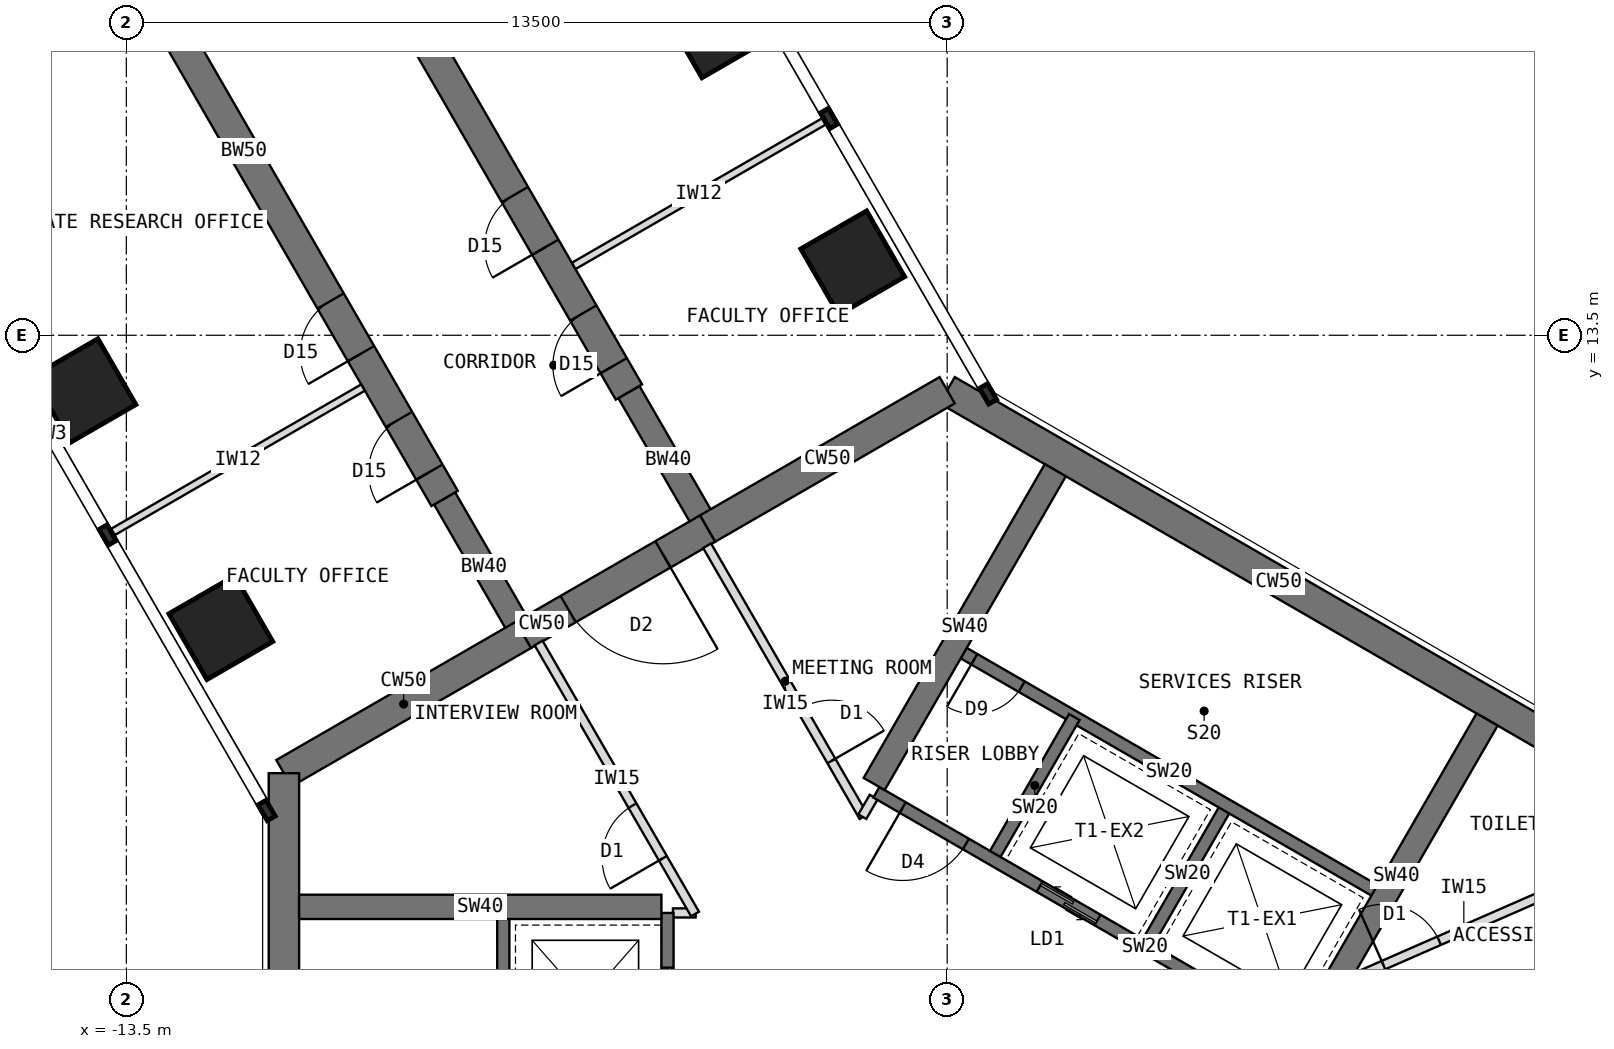
"""IFC4 building model, lengths in metres.
Left out: names, types, materials, properties, quantities, classifications, styles, units other than length and angle.
Written with IfcOpenShell. Run it as: python <this file> out.ifc"""

import sys

from ifc_helpers import new_model, si_unit, direction, frame, frame_2d, origin, origin_2d, place, context, subcontext, project, spatial, rectangle, extrude, element, fill, save


model = new_model("IFC4")
c1 = context("Model", 3, precision=1e-05, world=origin(), true_north=direction((0.0, 1.0)))
c2 = subcontext(c1, "Body", "Model", "MODEL_VIEW")
j1 = project(units=[si_unit("LENGTHUNIT", "METRE"), si_unit("PLANEANGLEUNIT", "RADIAN")], contexts=[c1])
p1 = place(None, origin())
s1 = spatial("IfcSite", under=j1, at=p1, CompositionType="ELEMENT")
p2 = place(p1, origin())
s2 = spatial("IfcBuilding", under=s1, at=p2, CompositionType="ELEMENT")
p3 = place(p2, frame((0.0, 0.0, 170.5)))
s3 = spatial("IfcBuildingStorey", under=s2, at=p3, CompositionType="ELEMENT", Elevation=170.5)
p4 = place(p3, frame((10.908, 6.298, 0.0), z_axis=(0.0, 0.0, 1.0), x_axis=(-0.866021940709, 0.500005998175, 0.0)))
e1 = element("IfcWall", 1, at=p4, inside=s3, PredefinedType="SHEAR", context=c2, shape_type="SweptSolid", body=[
    extrude(rectangle(XDim=12.596, YDim=0.5, at=frame_2d((6.298, 0.0))), origin(), (0.0, 0.0, 1.0), 4.0),
])
p5 = place(p3, frame((0.0, 12.596, 0.0), z_axis=(0.0, 0.0, 1.0), x_axis=(-0.866011268655, -0.500024481964, 0.0)))
e2 = element("IfcWall", 2, at=p5, inside=s3, PredefinedType="SHEAR", context=c2, shape_type="SweptSolid", body=[
    extrude(rectangle(XDim=4.548, YDim=0.5, at=frame_2d((2.274, 0.0))), origin(), (0.0, 0.0, 1.0), 4.0),
])
p6 = place(p3, frame((-3.939, 10.322, 0.0), z_axis=(0.0, 0.0, 1.0), x_axis=(-0.866019471182, -0.500010275428, 0.0)))
e3 = element("IfcWall", 3, at=p6, inside=s3, PredefinedType="SHEAR", context=c2, shape_type="SweptSolid", body=[
    extrude(rectangle(XDim=3.5, YDim=0.5, at=frame_2d((1.75, 0.0))), origin(), (0.0, 0.0, 1.0), 4.0),
])
p7 = place(p6, frame((0.85, 0.0, 0.0)))
e4 = element("IfcOpeningElement", 4, at=p7, cuts=e3, PredefinedType="OPENING", context=c2, shape_type="SweptSolid", body=[
    extrude(rectangle(XDim=1.8, YDim=2.1, at=frame_2d((0.9, 1.05))), frame((0.0, 0.26, 0.0), z_axis=(0.0, -1.0, 0.0), x_axis=(1.0, 0.0, 0.0)), (0.0, 0.0, 1.0), 0.52),
])
p8 = place(p3, frame((-6.97, 8.572, 0.0), z_axis=(0.0, 0.0, 1.0), x_axis=(-0.866034513004, -0.499984222037, 0.0)))
e5 = element("IfcWall", 5, at=p8, inside=s3, PredefinedType="SHEAR", context=c2, shape_type="SweptSolid", body=[
    extrude(rectangle(XDim=4.548, YDim=0.5, at=frame_2d((2.274, 0.0))), origin(), (0.0, 0.0, 1.0), 4.0),
])
p9 = place(p3, frame((-10.908, 6.298, 0.0), z_axis=(0.0, 0.0, 1.0), x_axis=(0.0, -1.0, 0.0)))
e6 = element("IfcWall", 6, at=p9, inside=s3, PredefinedType="SHEAR", context=c2, shape_type="SweptSolid", body=[
    extrude(rectangle(XDim=12.596, YDim=0.5, at=frame_2d((6.298, 0.0))), origin(), (0.0, 0.0, 1.0), 4.0),
])
p10 = place(p3, frame((-6.97, 8.572, 0.0), z_axis=(0.0, 0.0, 1.0), x_axis=(-0.499988811324, 0.866031863473, 0.0)))
e7 = element("IfcWall", 7, at=p10, inside=s3, PredefinedType="SHEAR", context=c2, shape_type="SweptSolid", body=[
    extrude(rectangle(XDim=2.592, YDim=0.4, at=frame_2d((1.296, 0.0))), origin(), (0.0, 0.0, 1.0), 4.0),
])
p11 = place(p3, frame((-8.266, 10.816, 0.0), z_axis=(0.0, 0.0, 1.0), x_axis=(-0.499996231654, 0.866027579429, 0.0)))
e8 = element("IfcWall", 8, at=p11, inside=s3, PredefinedType="SHEAR", context=c2, shape_type="SweptSolid", body=[
    extrude(rectangle(XDim=13.2, YDim=0.5, at=frame_2d((6.6, 0.0))), origin(), (0.0, 0.0, 1.0), 4.0),
])
p12 = place(p11, frame((0.5, 0.0, 0.0)))
e9 = element("IfcOpeningElement", 9, at=p12, cuts=e8, PredefinedType="OPENING", context=c2, shape_type="SweptSolid", body=[
    extrude(rectangle(XDim=1.0, YDim=2.1, at=frame_2d((0.5, 1.05))), frame((0.0, 0.26, 0.0), z_axis=(0.0, -1.0, 0.0), x_axis=(1.0, 0.0, 0.0)), (0.0, 0.0, 1.0), 0.52),
])
p13 = place(p11, frame((2.75, 0.0, 0.0)))
e10 = element("IfcOpeningElement", 10, at=p13, cuts=e8, PredefinedType="OPENING", context=c2, shape_type="SweptSolid", body=[
    extrude(rectangle(XDim=1.0, YDim=2.1, at=frame_2d((0.5, 1.05))), frame((0.0, 0.26, 0.0), z_axis=(0.0, -1.0, 0.0), x_axis=(1.0, 0.0, 0.0)), (0.0, 0.0, 1.0), 0.52),
])
p14 = place(p3, frame((-3.939, 10.322, 0.0), z_axis=(0.0, 0.0, 1.0), x_axis=(-0.499918158782, 0.866072649678, 0.0)))
e11 = element("IfcWall", 11, at=p14, inside=s3, PredefinedType="SHEAR", context=c2, shape_type="SweptSolid", body=[
    extrude(rectangle(XDim=2.592, YDim=0.4, at=frame_2d((1.296, 0.0))), origin(), (0.0, 0.0, 1.0), 4.0),
])
p15 = place(p3, frame((-5.234, 12.566, 0.0), z_axis=(0.0, 0.0, 1.0), x_axis=(-0.500010103361, 0.866019570528, 0.0)))
e12 = element("IfcWall", 12, at=p15, inside=s3, PredefinedType="SHEAR", context=c2, shape_type="SweptSolid", body=[
    extrude(rectangle(XDim=13.2, YDim=0.5, at=frame_2d((6.6, 0.0))), origin(), (0.0, 0.0, 1.0), 4.0),
])
p16 = place(p15, frame((0.5, 0.0, 0.0)))
e13 = element("IfcOpeningElement", 13, at=p16, cuts=e12, PredefinedType="OPENING", context=c2, shape_type="SweptSolid", body=[
    extrude(rectangle(XDim=1.0, YDim=2.1, at=frame_2d((0.5, 1.05))), frame((0.0, 0.26, 0.0), z_axis=(0.0, -1.0, 0.0), x_axis=(1.0, 0.0, 0.0)), (0.0, 0.0, 1.0), 0.52),
])
p17 = place(p15, frame((2.75, 0.0, 0.0)))
e14 = element("IfcOpeningElement", 14, at=p17, cuts=e12, PredefinedType="OPENING", context=c2, shape_type="SweptSolid", body=[
    extrude(rectangle(XDim=1.0, YDim=2.1, at=frame_2d((0.5, 1.05))), frame((0.0, 0.26, 0.0), z_axis=(0.0, -1.0, 0.0), x_axis=(1.0, 0.0, 0.0)), (0.0, 0.0, 1.0), 0.52),
])
for number, where, z_axis, x_axis in (
    (15, (-11.946, 8.691, 0.0), (0.0, 0.0, 1.0), (0.866, 0.5, 0.0)),
    (16, (-1.554, 14.691, 0.0), (0.0, 0.0, 1.0), (0.866, 0.5, 0.0)),
    (17, (-14.196, 12.588, 0.0), (0.0, 0.0, 1.0), (0.866, 0.5, 0.0)),
    (18, (-3.804, 18.588, 0.0), (0.0, 0.0, 1.0), (0.866, 0.5, 0.0)),
):
    element("IfcColumn", number, at=place(p3, frame(where, z_axis=z_axis, x_axis=x_axis)), inside=s3, PredefinedType="COLUMN", context=c2, shape_type="SweptSolid", body=[
        extrude(rectangle(XDim=1.25, YDim=1.25, at=origin_2d()), origin(), (0.0, 0.0, 1.0), 4.0),
    ])
p18 = place(p3, frame((5.764, 1.984, 0.0), z_axis=(0.0, 0.0, 1.0), x_axis=(-0.866026010844, 0.49999894854, 0.0)))
e19 = element("IfcWall", 19, at=p18, inside=s3, PredefinedType="SHEAR", context=c2, shape_type="SweptSolid", body=[
    extrude(rectangle(XDim=8.0, YDim=0.2, at=frame_2d((4.0, 0.0))), origin(), (0.0, 0.0, 1.0), 4.0),
])
p19 = place(p18, frame((6.3, 0.0, 0.0)))
e20 = element("IfcOpeningElement", 20, at=p19, cuts=e19, PredefinedType="OPENING", context=c2, shape_type="SweptSolid", body=[
    extrude(rectangle(XDim=1.2, YDim=2.1, at=frame_2d((0.6, 1.05))), frame((0.0, 0.11, 0.0), z_axis=(0.0, -1.0, 0.0), x_axis=(1.0, 0.0, 0.0)), (0.0, 0.0, 1.0), 0.22),
])
p20 = place(p18, frame((0.9, 0.0, 0.0)))
e21 = element("IfcOpeningElement", 21, at=p20, cuts=e19, PredefinedType="OPENING", context=c2, shape_type="SweptSolid", body=[
    extrude(rectangle(XDim=1.1, YDim=2.2, at=frame_2d((0.55, 1.1))), frame((0.0, 0.11, 0.0), z_axis=(0.0, -1.0, 0.0), x_axis=(1.0, 0.0, 0.0)), (0.0, 0.0, 1.0), 0.22),
])
p21 = place(p18, frame((3.8, 0.0, 0.0)))
e22 = element("IfcOpeningElement", 22, at=p21, cuts=e19, PredefinedType="OPENING", context=c2, shape_type="SweptSolid", body=[
    extrude(rectangle(XDim=1.1, YDim=2.2, at=frame_2d((0.55, 1.1))), frame((0.0, 0.11, 0.0), z_axis=(0.0, -1.0, 0.0), x_axis=(1.0, 0.0, 0.0)), (0.0, 0.0, 1.0), 0.22),
])
for number, where, z_axis, x_axis in (
    (23, (3.303, 3.52, 0.0), (0.0, 0.0, 1.0), (0.5, 0.866, 0.0)),
    (24, (0.791, 4.97, 0.0), (0.0, 0.0, 1.0), (0.5, 0.866, 0.0)),
):
    element("IfcWall", number, at=place(p3, frame(where, z_axis=z_axis, x_axis=x_axis)), inside=s3, PredefinedType="SHEAR", context=c2, shape_type="SweptSolid", body=[
        extrude(rectangle(XDim=2.6, YDim=0.2, at=frame_2d((1.3, 0.0))), origin(), (0.0, 0.0, 1.0), 4.0),
    ])
p22 = place(p3, frame((7.114, 4.322, 0.0), z_axis=(0.0, 0.0, 1.0), x_axis=(-0.866026010844, 0.49999894854, 0.0)))
e25 = element("IfcWall", 25, at=p22, inside=s3, PredefinedType="SHEAR", context=c2, shape_type="SweptSolid", body=[
    extrude(rectangle(XDim=8.0, YDim=0.2, at=frame_2d((4.0, 0.0))), origin(), (0.0, 0.0, 1.0), 4.0),
])
p23 = place(p22, frame((6.8, 0.0, 0.0)))
e26 = element("IfcOpeningElement", 26, at=p23, cuts=e25, PredefinedType="OPENING", context=c2, shape_type="SweptSolid", body=[
    extrude(rectangle(XDim=0.9, YDim=2.1, at=frame_2d((0.45, 1.05))), frame((0.0, 0.11, 0.0), z_axis=(0.0, -1.0, 0.0), x_axis=(1.0, 0.0, 0.0)), (0.0, 0.0, 1.0), 0.22),
])
p24 = place(p3, frame((-1.201, 6.12, 0.0), z_axis=(0.0, 0.0, 1.0), x_axis=(0.500021575205, 0.866012946976, 0.0)))
e27 = element("IfcWall", 27, at=p24, inside=s3, PredefinedType="SHEAR", context=c2, shape_type="SweptSolid", body=[
    extrude(rectangle(XDim=5.958, YDim=0.4, at=frame_2d((2.979, 0.0))), origin(), (0.0, 0.0, 1.0), 4.0),
])
p25 = place(p3, frame((5.901, 2.02, 0.0), z_axis=(0.0, 0.0, 1.0), x_axis=(0.500003832394, 0.86602319114, 0.0)))
e28 = element("IfcWall", 28, at=p25, inside=s3, PredefinedType="SHEAR", context=c2, shape_type="SweptSolid", body=[
    extrude(rectangle(XDim=5.958, YDim=0.4, at=frame_2d((2.979, 0.0))), origin(), (0.0, 0.0, 1.0), 4.0),
])
p26 = place(p3, frame((-4.6, 4.0, 0.0), z_axis=(0.0, 0.0, 1.0), x_axis=(0.0, -1.0, 0.0)))
e29 = element("IfcWall", 29, at=p26, inside=s3, PredefinedType="SHEAR", context=c2, shape_type="SweptSolid", body=[
    extrude(rectangle(XDim=8.0, YDim=0.2, at=frame_2d((4.0, 0.0))), origin(), (0.0, 0.0, 1.0), 4.0),
])
p27 = place(p26, frame((6.3, 0.0, 0.0)))
e30 = element("IfcOpeningElement", 30, at=p27, cuts=e29, PredefinedType="OPENING", context=c2, shape_type="SweptSolid", body=[
    extrude(rectangle(XDim=1.2, YDim=2.1, at=frame_2d((0.6, 1.05))), frame((0.0, 0.11, 0.0), z_axis=(0.0, -1.0, 0.0), x_axis=(1.0, 0.0, 0.0)), (0.0, 0.0, 1.0), 0.22),
])
p28 = place(p26, frame((0.9, 0.0, 0.0)))
e31 = element("IfcOpeningElement", 31, at=p28, cuts=e29, PredefinedType="OPENING", context=c2, shape_type="SweptSolid", body=[
    extrude(rectangle(XDim=1.1, YDim=2.2, at=frame_2d((0.55, 1.1))), frame((0.0, 0.11, 0.0), z_axis=(0.0, -1.0, 0.0), x_axis=(1.0, 0.0, 0.0)), (0.0, 0.0, 1.0), 0.22),
])
p29 = place(p3, frame((-7.3, 4.0, 0.0), z_axis=(0.0, 0.0, 1.0), x_axis=(0.0, -1.0, 0.0)))
e32 = element("IfcWall", 32, at=p29, inside=s3, PredefinedType="SHEAR", context=c2, shape_type="SweptSolid", body=[
    extrude(rectangle(XDim=8.0, YDim=0.2, at=frame_2d((4.0, 0.0))), origin(), (0.0, 0.0, 1.0), 4.0),
])
p30 = place(p29, frame((6.7, 0.0, 0.0)))
e33 = element("IfcOpeningElement", 33, at=p30, cuts=e32, PredefinedType="OPENING", context=c2, shape_type="SweptSolid", body=[
    extrude(rectangle(XDim=1.1, YDim=2.1, at=frame_2d((0.55, 1.05))), frame((0.0, 0.11, 0.0), z_axis=(0.0, -1.0, 0.0), x_axis=(1.0, 0.0, 0.0)), (0.0, 0.0, 1.0), 0.22),
])
p31 = place(p3, frame((-4.7, 4.1, 0.0), z_axis=(0.0, 0.0, 1.0), x_axis=(-1.0, 0.0, 0.0)))
e34 = element("IfcWall", 34, at=p31, inside=s3, PredefinedType="SHEAR", context=c2, shape_type="SweptSolid", body=[
    extrude(rectangle(XDim=5.958, YDim=0.4, at=frame_2d((2.979, 0.0))), origin(), (0.0, 0.0, 1.0), 4.0),
])
for number, where, z_axis, x_axis in (
    (35, (-9.607, 12.64, 0.0), (0.0, 0.0, 1.0), (-0.866, -0.5, 0.0)),
    (36, (-6.143, 14.64, 0.0), (0.0, 0.0, 1.0), (0.866, 0.5, 0.0)),
):
    element("IfcWall", number, at=place(p3, frame(where, z_axis=z_axis, x_axis=x_axis)), inside=s3, PredefinedType="PARTITIONING", context=c2, shape_type="SweptSolid", body=[
        extrude(rectangle(XDim=4.75, YDim=0.12, at=frame_2d((2.375, 0.0))), origin(), (0.0, 0.0, 1.0), 3.8),
    ])
p32 = place(p3, frame((-4.51, 4.0, 0.0), z_axis=(0.0, 0.0, 1.0), x_axis=(1.0, 0.0, 0.0)))
e37 = element("IfcWall", 37, at=p32, inside=s3, PredefinedType="PARTITIONING", context=c2, shape_type="SweptSolid", body=[
    extrude(rectangle(XDim=0.373, YDim=0.15, at=frame_2d((0.187, 0.0))), origin(), (0.0, 0.0, 1.0), 3.8),
])
p33 = place(p3, frame((-4.147, 3.983, 0.0), z_axis=(0.0, 0.0, 1.0), x_axis=(-0.499986674824, 0.866033096941, 0.0)))
e38 = element("IfcWall", 38, at=p33, inside=s3, PredefinedType="PARTITIONING", context=c2, shape_type="SweptSolid", body=[
    extrude(rectangle(XDim=5.146, YDim=0.15, at=frame_2d((2.573, 0.0))), origin(), (0.0, 0.0, 1.0), 3.8),
])
p34 = place(p33, frame((1.058, 0.0, 0.0)))
e39 = element("IfcOpeningElement", 39, at=p34, cuts=e38, PredefinedType="OPENING", context=c2, shape_type="SweptSolid", body=[
    extrude(rectangle(XDim=1.0, YDim=2.1, at=frame_2d((0.5, 1.05))), frame((0.0, 0.085, 0.0), z_axis=(0.0, -1.0, 0.0), x_axis=(1.0, 0.0, 0.0)), (0.0, 0.0, 1.0), 0.17),
])
p35 = place(p3, frame((-3.948, 10.039, 0.0), z_axis=(0.0, 0.0, 1.0), x_axis=(0.500022258742, -0.866012552312, 0.0)))
e40 = element("IfcWall", 40, at=p35, inside=s3, PredefinedType="PARTITIONING", context=c2, shape_type="SweptSolid", body=[
    extrude(rectangle(XDim=5.146, YDim=0.15, at=frame_2d((2.573, 0.0))), origin(), (0.0, 0.0, 1.0), 3.8),
])
p36 = place(p35, frame((3.088, 0.0, 0.0)))
e41 = element("IfcOpeningElement", 41, at=p36, cuts=e40, PredefinedType="OPENING", context=c2, shape_type="SweptSolid", body=[
    extrude(rectangle(XDim=1.0, YDim=2.1, at=frame_2d((0.5, 1.05))), frame((0.0, 0.085, 0.0), z_axis=(0.0, -1.0, 0.0), x_axis=(1.0, 0.0, 0.0)), (0.0, 0.0, 1.0), 0.17),
])
p37 = place(p3, frame((-1.396, 5.583, 0.0), z_axis=(0.0, 0.0, 1.0), x_axis=(0.500081290722, 0.865978465477, 0.0)))
e42 = element("IfcWall", 42, at=p37, inside=s3, PredefinedType="PARTITIONING", context=c2, shape_type="SweptSolid", body=[
    extrude(rectangle(XDim=0.373, YDim=0.15, at=frame_2d((0.187, 0.0))), origin(), (0.0, 0.0, 1.0), 3.8),
])
p38 = place(p3, frame((6.336, 2.774, 0.0), z_axis=(0.0, 0.0, 1.0), x_axis=(0.916033790083, 0.401101103746, 0.0)))
e43 = element("IfcWall", 43, at=p38, inside=s3, PredefinedType="PARTITIONING", context=c2, shape_type="SweptSolid", body=[
    extrude(rectangle(XDim=4.719, YDim=0.15, at=frame_2d((2.359, 0.0))), origin(), (0.0, 0.0, 1.0), 3.8),
])
p39 = place(p38, frame((0.916, 0.0, 0.0)))
e44 = element("IfcOpeningElement", 44, at=p39, cuts=e43, PredefinedType="OPENING", context=c2, shape_type="SweptSolid", body=[
    extrude(rectangle(XDim=1.0, YDim=2.1, at=frame_2d((0.5, 1.05))), frame((0.0, 0.085, 0.0), z_axis=(0.0, -1.0, 0.0), x_axis=(1.0, 0.0, 0.0)), (0.0, 0.0, 1.0), 0.17),
])
p40 = place(p19, origin())
e45 = element("IfcDoor", 45, at=p40, inside=s3, OperationType="SINGLE_SWING_RIGHT", PredefinedType="DOOR", context=c2, shape_type="SweptSolid", body=[
    extrude(rectangle(XDim=1.2, YDim=2.1, at=frame_2d((0.6, 1.05))), frame((0.0, 0.025, 0.0), z_axis=(0.0, -1.0, 0.0), x_axis=(1.0, 0.0, 0.0)), (0.0, 0.0, 1.0), 0.05),
])
fill(e20, e45)
p41 = place(p21, origin())
e46 = element("IfcDoor", 46, at=p41, inside=s3, OperationType="DOUBLE_DOOR_SLIDING", PredefinedType="DOOR", context=c2, shape_type="SweptSolid", body=[
    extrude(rectangle(XDim=1.1, YDim=2.2, at=frame_2d((0.55, 1.1))), frame((0.0, 0.025, 0.0), z_axis=(0.0, -1.0, 0.0), x_axis=(1.0, 0.0, 0.0)), (0.0, 0.0, 1.0), 0.05),
])
fill(e22, e46)
p42 = place(p23, origin())
e47 = element("IfcDoor", 47, at=p42, inside=s3, OperationType="SINGLE_SWING_RIGHT", PredefinedType="DOOR", context=c2, shape_type="SweptSolid", body=[
    extrude(rectangle(XDim=0.9, YDim=2.1, at=frame_2d((0.45, 1.05))), frame((0.0, 0.025, 0.0), z_axis=(0.0, -1.0, 0.0), x_axis=(1.0, 0.0, 0.0)), (0.0, 0.0, 1.0), 0.05),
])
fill(e26, e47)
p43 = place(p28, origin())
e48 = element("IfcDoor", 48, at=p43, inside=s3, OperationType="DOUBLE_DOOR_SLIDING", PredefinedType="DOOR", context=c2, shape_type="SweptSolid", body=[
    extrude(rectangle(XDim=1.1, YDim=2.2, at=frame_2d((0.55, 1.1))), frame((0.0, 0.025, 0.0), z_axis=(0.0, -1.0, 0.0), x_axis=(1.0, 0.0, 0.0)), (0.0, 0.0, 1.0), 0.05),
])
fill(e31, e48)
p44 = place(p7, origin())
e49 = element("IfcDoor", 49, at=p44, inside=s3, OperationType="DOUBLE_DOOR_DOUBLE_SWING", PredefinedType="DOOR", context=c2, shape_type="SweptSolid", body=[
    extrude(rectangle(XDim=1.8, YDim=2.1, at=frame_2d((0.9, 1.05))), frame((0.0, 0.025, 0.0), z_axis=(0.0, -1.0, 0.0), x_axis=(1.0, 0.0, 0.0)), (0.0, 0.0, 1.0), 0.05),
])
fill(e4, e49)
p45 = place(p39, origin())
e50 = element("IfcDoor", 50, at=p45, inside=s3, OperationType="SINGLE_SWING_LEFT", PredefinedType="DOOR", context=c2, shape_type="SweptSolid", body=[
    extrude(rectangle(XDim=1.0, YDim=2.1, at=frame_2d((0.5, 1.05))), frame((0.0, 0.025, 0.0), z_axis=(0.0, -1.0, 0.0), x_axis=(1.0, 0.0, 0.0)), (0.0, 0.0, 1.0), 0.05),
])
fill(e44, e50)
p46 = place(p36, origin())
e51 = element("IfcDoor", 51, at=p46, inside=s3, OperationType="SINGLE_SWING_RIGHT", PredefinedType="DOOR", context=c2, shape_type="SweptSolid", body=[
    extrude(rectangle(XDim=1.0, YDim=2.1, at=frame_2d((0.5, 1.05))), frame((0.0, 0.025, 0.0), z_axis=(0.0, -1.0, 0.0), x_axis=(1.0, 0.0, 0.0)), (0.0, 0.0, 1.0), 0.05),
])
fill(e41, e51)
p47 = place(p34, origin())
e52 = element("IfcDoor", 52, at=p47, inside=s3, OperationType="SINGLE_SWING_LEFT", PredefinedType="DOOR", context=c2, shape_type="SweptSolid", body=[
    extrude(rectangle(XDim=1.0, YDim=2.1, at=frame_2d((0.5, 1.05))), frame((0.0, 0.025, 0.0), z_axis=(0.0, -1.0, 0.0), x_axis=(1.0, 0.0, 0.0)), (0.0, 0.0, 1.0), 0.05),
])
fill(e39, e52)
p48 = place(p12, origin())
e53 = element("IfcDoor", 53, at=p48, inside=s3, OperationType="SINGLE_SWING_LEFT", PredefinedType="DOOR", context=c2, shape_type="SweptSolid", body=[
    extrude(rectangle(XDim=1.0, YDim=2.1, at=frame_2d((0.5, 1.05))), frame((0.0, 0.025, 0.0), z_axis=(0.0, -1.0, 0.0), x_axis=(1.0, 0.0, 0.0)), (0.0, 0.0, 1.0), 0.05),
])
fill(e9, e53)
p49 = place(p13, origin())
e54 = element("IfcDoor", 54, at=p49, inside=s3, OperationType="SINGLE_SWING_LEFT", PredefinedType="DOOR", context=c2, shape_type="SweptSolid", body=[
    extrude(rectangle(XDim=1.0, YDim=2.1, at=frame_2d((0.5, 1.05))), frame((0.0, 0.025, 0.0), z_axis=(0.0, -1.0, 0.0), x_axis=(1.0, 0.0, 0.0)), (0.0, 0.0, 1.0), 0.05),
])
fill(e10, e54)
p50 = place(p16, origin())
e55 = element("IfcDoor", 55, at=p50, inside=s3, OperationType="SINGLE_SWING_LEFT", PredefinedType="DOOR", context=c2, shape_type="SweptSolid", body=[
    extrude(rectangle(XDim=1.0, YDim=2.1, at=frame_2d((0.5, 1.05))), frame((0.0, 0.025, 0.0), z_axis=(0.0, -1.0, 0.0), x_axis=(1.0, 0.0, 0.0)), (0.0, 0.0, 1.0), 0.05),
])
fill(e13, e55)
p51 = place(p17, origin())
e56 = element("IfcDoor", 56, at=p51, inside=s3, OperationType="SINGLE_SWING_LEFT", PredefinedType="DOOR", context=c2, shape_type="SweptSolid", body=[
    extrude(rectangle(XDim=1.0, YDim=2.1, at=frame_2d((0.5, 1.05))), frame((0.0, 0.025, 0.0), z_axis=(0.0, -1.0, 0.0), x_axis=(1.0, 0.0, 0.0)), (0.0, 0.0, 1.0), 0.05),
])
fill(e14, e56)
save(model, sys.argv[1])
